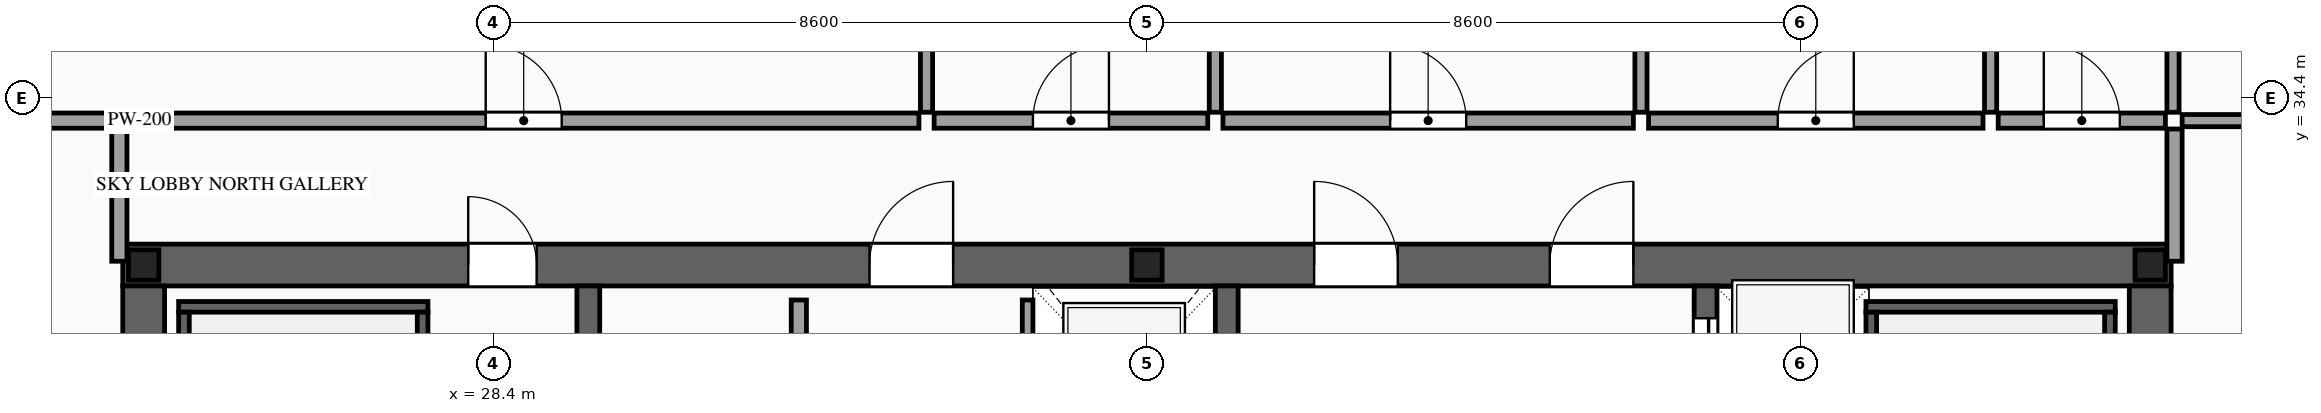
"""IFC4 building model, lengths in metres.
Left out: names, types, materials, properties, quantities, classifications, styles, units other than length and angle.
Written with IfcOpenShell. Run it as: python <this file> out.ifc"""

import sys

from ifc_helpers import new_model, si_unit, direction, frame, frame_2d, origin, origin_2d, place, context, subcontext, project, spatial, rectangle, i_section, extrude, source, transform, mapped, element, fill, save


model = new_model("IFC4")
c1 = context("Model", 3, precision=1e-05, world=origin(), true_north=direction((0.0, 1.0)))
c2 = subcontext(c1, "Body", "Model", "MODEL_VIEW")
j1 = project(units=[si_unit("LENGTHUNIT", "METRE"), si_unit("PLANEANGLEUNIT", "RADIAN")], contexts=[c1])
p1 = place(None, origin())
s1 = spatial("IfcSite", under=j1, at=p1, CompositionType="ELEMENT")
p2 = place(p1, origin())
s2 = spatial("IfcBuilding", under=s1, at=p2, CompositionType="ELEMENT")
p3 = place(p2, frame((0.0, 0.0, 259.1)))
s3 = spatial("IfcBuildingStorey", under=s2, at=p3, CompositionType="ELEMENT", Elevation=259.1)
p4 = place(p3, frame((23.525, 32.2, 0.0), z_axis=(0.0, 0.0, 1.0), x_axis=(1.0, 0.0, 0.0)))
e1 = element("IfcWall", 1, at=p4, inside=s3, PredefinedType="SHEAR", context=c2, shape_type="SweptSolid", body=[
    extrude(rectangle(XDim=26.95, YDim=0.55, at=frame_2d((13.475, 0.0))), origin(), (0.0, 0.0, 1.0), 4.4),
])
p5 = place(p4, frame((4.545, 0.0, 0.0)))
e2 = element("IfcOpeningElement", 2, at=p5, cuts=e1, PredefinedType="OPENING", context=c2, shape_type="SweptSolid", body=[
    extrude(rectangle(XDim=0.9, YDim=2.15, at=frame_2d((0.45, 1.075))), frame((0.0, 0.29, 0.0), z_axis=(0.0, -1.0, 0.0), x_axis=(1.0, 0.0, 0.0)), (0.0, 0.0, 1.0), 0.58),
])
p6 = place(p4, frame((9.825, 0.0, 0.0)))
e3 = element("IfcOpeningElement", 3, at=p6, cuts=e1, PredefinedType="OPENING", context=c2, shape_type="SweptSolid", body=[
    extrude(rectangle(XDim=1.1, YDim=2.2, at=frame_2d((0.55, 1.1))), frame((0.0, 0.29, 0.0), z_axis=(0.0, -1.0, 0.0), x_axis=(1.0, 0.0, 0.0)), (0.0, 0.0, 1.0), 0.58),
])
p7 = place(p4, frame((15.675, 0.0, 0.0)))
e4 = element("IfcOpeningElement", 4, at=p7, cuts=e1, PredefinedType="OPENING", context=c2, shape_type="SweptSolid", body=[
    extrude(rectangle(XDim=1.1, YDim=2.2, at=frame_2d((0.55, 1.1))), frame((0.0, 0.29, 0.0), z_axis=(0.0, -1.0, 0.0), x_axis=(1.0, 0.0, 0.0)), (0.0, 0.0, 1.0), 0.58),
])
p8 = place(p4, frame((18.775, 0.0, 0.0)))
e5 = element("IfcOpeningElement", 5, at=p8, cuts=e1, PredefinedType="OPENING", context=c2, shape_type="SweptSolid", body=[
    extrude(rectangle(XDim=1.1, YDim=2.2, at=frame_2d((0.55, 1.1))), frame((0.0, 0.29, 0.0), z_axis=(0.0, -1.0, 0.0), x_axis=(1.0, 0.0, 0.0)), (0.0, 0.0, 1.0), 0.58),
])
m1 = source(origin(), c2, "Body", "SweptSolid", [
    extrude(rectangle(XDim=12.25, YDim=0.55, at=frame_2d((6.125, 0.0))), origin(), (0.0, 0.0, 1.0), 4.4),
])
for number, where, z_axis, x_axis in (
    (6, (23.8, 19.675, 0.0), (0.0, 0.0, 1.0), (0.0, 1.0, 0.0)),
    (7, (50.2, 19.675, 0.0), (0.0, 0.0, 1.0), (0.0, 1.0, 0.0)),
):
    element("IfcWall", number, at=place(p3, frame(where, z_axis=z_axis, x_axis=x_axis)), inside=s3, PredefinedType="SHEAR", context=c2, shape_type="MappedRepresentation", body=[
        mapped(m1, transform((0.0, 0.0, 0.0), scale=1.0)),
    ])
m2 = source(origin(), c2, "Body", "SweptSolid", [
    extrude(rectangle(XDim=12.25, YDim=0.3, at=frame_2d((6.125, 0.0))), origin(), (0.0, 0.0, 1.0), 4.4),
])
for number, where, z_axis, x_axis in (
    (8, (29.65, 19.675, 0.0), (0.0, 0.0, 1.0), (0.0, 1.0, 0.0)),
    (9, (38.05, 19.675, 0.0), (0.0, 0.0, 1.0), (0.0, 1.0, 0.0)),
):
    element("IfcWall", number, at=place(p3, frame(where, z_axis=z_axis, x_axis=x_axis)), inside=s3, PredefinedType="SOLIDWALL", context=c2, shape_type="MappedRepresentation", body=[
        mapped(m2, transform((0.0, 0.0, 0.0), scale=1.0)),
    ])
p9 = place(p3, frame((44.35, 19.675, 0.0), z_axis=(0.0, 0.0, 1.0), x_axis=(0.0, 1.0, 0.0)))
e10 = element("IfcWall", 10, at=p9, inside=s3, PredefinedType="SOLIDWALL", context=c2, shape_type="SweptSolid", body=[
    extrude(rectangle(XDim=12.25, YDim=0.3, at=frame_2d((6.125, 0.0))), origin(), (0.0, 0.0, 1.0), 4.4),
])
p10 = place(p9, frame((6.525, 0.0, 0.0)))
e11 = element("IfcOpeningElement", 11, at=p10, cuts=e10, PredefinedType="OPENING", context=c2, shape_type="SweptSolid", body=[
    extrude(rectangle(XDim=1.1, YDim=2.2, at=frame_2d((0.55, 1.1))), frame((0.0, 0.165, 0.0), z_axis=(0.0, -1.0, 0.0), x_axis=(1.0, 0.0, 0.0)), (0.0, 0.0, 1.0), 0.33),
])
p11 = place(p9, frame((8.625, 0.0, 0.0)))
e12 = element("IfcOpeningElement", 12, at=p11, cuts=e10, PredefinedType="OPENING", context=c2, shape_type="SweptSolid", body=[
    extrude(rectangle(XDim=1.1, YDim=2.2, at=frame_2d((0.55, 1.1))), frame((0.0, 0.165, 0.0), z_axis=(0.0, -1.0, 0.0), x_axis=(1.0, 0.0, 0.0)), (0.0, 0.0, 1.0), 0.33),
])
p12 = place(p9, frame((10.725, 0.0, 0.0)))
e13 = element("IfcOpeningElement", 13, at=p12, cuts=e10, PredefinedType="OPENING", context=c2, shape_type="SweptSolid", body=[
    extrude(rectangle(XDim=1.1, YDim=2.2, at=frame_2d((0.55, 1.1))), frame((0.0, 0.165, 0.0), z_axis=(0.0, -1.0, 0.0), x_axis=(1.0, 0.0, 0.0)), (0.0, 0.0, 1.0), 0.33),
])
m3 = source(origin(), c2, "Body", "SweptSolid", [
    extrude(i_section(OverallWidth=0.4, OverallDepth=0.4, WebThickness=0.013, FlangeThickness=0.021, at=origin_2d()), origin(), (0.0, 0.0, 1.0), 4.4),
])
for number, where, z_axis, x_axis in (
    (14, (23.8, 32.2, 0.0), (0.0, 0.0, 1.0), (1.0, 0.0, 0.0)),
    (15, (37.0, 32.2, 0.0), (0.0, 0.0, 1.0), (1.0, 0.0, 0.0)),
    (16, (50.2, 32.2, 0.0), (0.0, 0.0, 1.0), (1.0, 0.0, 0.0)),
):
    element("IfcColumn", number, at=place(p3, frame(where, z_axis=z_axis, x_axis=x_axis)), inside=s3, PredefinedType="COLUMN", context=c2, shape_type="MappedRepresentation", body=[
        mapped(m3, transform((0.0, 0.0, 0.0), scale=1.0)),
    ])
p13 = place(p3, frame((35.43, 29.4, 0.0), z_axis=(0.0, 0.0, 1.0), x_axis=(0.0, 1.0, 0.0)))
e17 = element("IfcWall", 17, at=p13, inside=s3, PredefinedType="SOLIDWALL", context=c2, shape_type="SweptSolid", body=[
    extrude(rectangle(XDim=2.34, YDim=0.14, at=frame_2d((1.17, 0.0))), origin(), (0.0, 0.0, 1.0), 4.12),
])
p14 = place(p13, frame((0.62, 0.0, 0.0)))
e18 = element("IfcOpeningElement", 18, at=p14, cuts=e17, PredefinedType="OPENING", context=c2, shape_type="SweptSolid", body=[
    extrude(rectangle(XDim=1.1, YDim=2.2, at=frame_2d((0.55, 1.1))), frame((0.0, 0.085, 0.0), z_axis=(0.0, -1.0, 0.0), x_axis=(1.0, 0.0, 0.0)), (0.0, 0.0, 1.0), 0.17),
])
m4 = source(origin(), c2, "Body", "SweptSolid", [
    extrude(rectangle(XDim=3.28, YDim=0.14, at=frame_2d((1.64, 0.0))), origin(), (0.0, 0.0, 1.0), 4.12),
])
p15 = place(p3, frame((24.26, 31.65, 0.0), z_axis=(0.0, 0.0, 1.0), x_axis=(1.0, 0.0, 0.0)))
e19 = element("IfcWall", 19, at=p15, inside=s3, PredefinedType="SOLIDWALL", context=c2, shape_type="MappedRepresentation", body=[
    mapped(m4, transform((0.0, 0.0, 0.0), scale=1.0)),
])
m5 = source(origin(), c2, "Body", "SweptSolid", [
    extrude(rectangle(XDim=8.94, YDim=0.14, at=frame_2d((4.47, 0.0))), origin(), (0.0, 0.0, 1.0), 4.12),
])
for number, where, z_axis, x_axis in (
    (20, (24.33, 22.64, 0.0), (0.0, 0.0, 1.0), (0.0, 1.0, 0.0)),
    (21, (27.47, 22.64, 0.0), (0.0, 0.0, 1.0), (0.0, 1.0, 0.0)),
):
    element("IfcWall", number, at=place(p3, frame(where, z_axis=z_axis, x_axis=x_axis)), inside=s3, PredefinedType="SOLIDWALL", context=c2, shape_type="MappedRepresentation", body=[
        mapped(m5, transform((0.0, 0.0, 0.0), scale=1.0)),
    ])
p16 = place(p3, frame((46.46, 31.65, 0.0), z_axis=(0.0, 0.0, 1.0), x_axis=(1.0, 0.0, 0.0)))
e22 = element("IfcWall", 22, at=p16, inside=s3, PredefinedType="SOLIDWALL", context=c2, shape_type="MappedRepresentation", body=[
    mapped(m4, transform((0.0, 0.0, 0.0), scale=1.0)),
])
for number, where, z_axis, x_axis in (
    (23, (46.53, 22.64, 0.0), (0.0, 0.0, 1.0), (0.0, 1.0, 0.0)),
    (24, (49.67, 22.64, 0.0), (0.0, 0.0, 1.0), (0.0, 1.0, 0.0)),
):
    element("IfcWall", number, at=place(p3, frame(where, z_axis=z_axis, x_axis=x_axis)), inside=s3, PredefinedType="SOLIDWALL", context=c2, shape_type="MappedRepresentation", body=[
        mapped(m5, transform((0.0, 0.0, 0.0), scale=1.0)),
    ])
p17 = place(p3, frame((32.42, 24.05, 0.0), z_axis=(0.0, 0.0, 1.0), x_axis=(0.0, 1.0, 0.0)))
e25 = element("IfcWall", 25, at=p17, inside=s3, PredefinedType="PARTITIONING", context=c2, shape_type="SweptSolid", body=[
    extrude(rectangle(XDim=7.69, YDim=0.2, at=frame_2d((3.845, 0.0))), origin(), (0.0, 0.0, 1.0), 4.12),
])
p18 = place(p17, frame((3.395, 0.0, 0.0)))
e26 = element("IfcOpeningElement", 26, at=p18, cuts=e25, PredefinedType="OPENING", context=c2, shape_type="SweptSolid", body=[
    extrude(rectangle(XDim=0.9, YDim=2.15, at=frame_2d((0.45, 1.075))), frame((0.0, 0.115, 0.0), z_axis=(0.0, -1.0, 0.0), x_axis=(1.0, 0.0, 0.0)), (0.0, 0.0, 1.0), 0.23),
])
m6 = source(origin(), c2, "Body", "SweptSolid", [
    extrude(rectangle(XDim=1.74, YDim=0.2, at=frame_2d((0.87, 0.0))), origin(), (0.0, 0.0, 1.0), 4.12),
])
for number, where, z_axis, x_axis in (
    (27, (23.48, 32.25, 0.0), (0.0, 0.0, 1.0), (0.0, 1.0, 0.0)),
    (28, (50.52, 32.25, 0.0), (0.0, 0.0, 1.0), (0.0, 1.0, 0.0)),
):
    element("IfcWall", number, at=place(p3, frame(where, z_axis=z_axis, x_axis=x_axis)), inside=s3, PredefinedType="PARTITIONING", context=c2, shape_type="MappedRepresentation", body=[
        mapped(m6, transform((0.0, 0.0, 0.0), scale=1.0)),
    ])
m7 = source(origin(), c2, "Body", "SweptSolid", [
    extrude(rectangle(XDim=6.83, YDim=0.16, at=frame_2d((3.415, 0.0))), origin(), (0.0, 0.0, 1.0), 4.12),
])
p19 = place(p3, frame((50.62, 34.1, 0.0), z_axis=(0.0, 0.0, 1.0), x_axis=(1.0, 0.0, 0.0)))
e29 = element("IfcWall", 29, at=p19, inside=s3, PredefinedType="PARTITIONING", context=c2, shape_type="MappedRepresentation", body=[
    mapped(m7, transform((0.0, 0.0, 0.0), scale=1.0)),
])
p20 = place(p3, frame((19.44, 34.1, 0.0), z_axis=(0.0, 0.0, 1.0), x_axis=(1.0, 0.0, 0.0)))
e30 = element("IfcWall", 30, at=p20, inside=s3, PredefinedType="PARTITIONING", context=c2, shape_type="SweptSolid", body=[
    extrude(rectangle(XDim=14.56, YDim=0.2, at=frame_2d((7.28, 0.0))), origin(), (0.0, 0.0, 1.0), 4.12),
])
p21 = place(p20, frame((8.86, 0.0, 0.0)))
e31 = element("IfcOpeningElement", 31, at=p21, cuts=e30, PredefinedType="OPENING", context=c2, shape_type="SweptSolid", body=[
    extrude(rectangle(XDim=1.0, YDim=2.2, at=frame_2d((0.5, 1.1))), frame((0.0, 0.115, 0.0), z_axis=(0.0, -1.0, 0.0), x_axis=(1.0, 0.0, 0.0)), (0.0, 0.0, 1.0), 0.23),
])
m8 = source(origin(), c2, "Body", "SweptSolid", [
    extrude(rectangle(XDim=12.04, YDim=0.16, at=frame_2d((6.02, 0.0))), origin(), (0.0, 0.0, 1.0), 4.12),
])
p22 = place(p3, frame((34.1, 34.21, 0.0), z_axis=(0.0, 0.0, 1.0), x_axis=(0.0, 1.0, 0.0)))
e32 = element("IfcWall", 32, at=p22, inside=s3, PredefinedType="PARTITIONING", context=c2, shape_type="MappedRepresentation", body=[
    mapped(m8, transform((0.0, 0.0, 0.0), scale=1.0)),
])
p23 = place(p3, frame((34.2, 34.1, 0.0), z_axis=(0.0, 0.0, 1.0), x_axis=(1.0, 0.0, 0.0)))
e33 = element("IfcWall", 33, at=p23, inside=s3, PredefinedType="PARTITIONING", context=c2, shape_type="SweptSolid", body=[
    extrude(rectangle(XDim=3.6, YDim=0.2, at=frame_2d((1.8, 0.0))), origin(), (0.0, 0.0, 1.0), 4.12),
])
p24 = place(p23, frame((1.3, 0.0, 0.0)))
e34 = element("IfcOpeningElement", 34, at=p24, cuts=e33, PredefinedType="OPENING", context=c2, shape_type="SweptSolid", body=[
    extrude(rectangle(XDim=1.0, YDim=2.2, at=frame_2d((0.5, 1.1))), frame((0.0, 0.115, 0.0), z_axis=(0.0, -1.0, 0.0), x_axis=(1.0, 0.0, 0.0)), (0.0, 0.0, 1.0), 0.23),
])
p25 = place(p3, frame((37.9, 34.21, 0.0), z_axis=(0.0, 0.0, 1.0), x_axis=(0.0, 1.0, 0.0)))
e35 = element("IfcWall", 35, at=p25, inside=s3, PredefinedType="PARTITIONING", context=c2, shape_type="MappedRepresentation", body=[
    mapped(m8, transform((0.0, 0.0, 0.0), scale=1.0)),
])
p26 = place(p3, frame((38.0, 34.1, 0.0), z_axis=(0.0, 0.0, 1.0), x_axis=(1.0, 0.0, 0.0)))
e36 = element("IfcWall", 36, at=p26, inside=s3, PredefinedType="PARTITIONING", context=c2, shape_type="SweptSolid", body=[
    extrude(rectangle(XDim=5.4, YDim=0.2, at=frame_2d((2.7, 0.0))), origin(), (0.0, 0.0, 1.0), 4.12),
])
p27 = place(p26, frame((2.2, 0.0, 0.0)))
e37 = element("IfcOpeningElement", 37, at=p27, cuts=e36, PredefinedType="OPENING", context=c2, shape_type="SweptSolid", body=[
    extrude(rectangle(XDim=1.0, YDim=2.2, at=frame_2d((0.5, 1.1))), frame((0.0, 0.115, 0.0), z_axis=(0.0, -1.0, 0.0), x_axis=(1.0, 0.0, 0.0)), (0.0, 0.0, 1.0), 0.23),
])
p28 = place(p3, frame((43.5, 34.21, 0.0), z_axis=(0.0, 0.0, 1.0), x_axis=(0.0, 1.0, 0.0)))
e38 = element("IfcWall", 38, at=p28, inside=s3, PredefinedType="PARTITIONING", context=c2, shape_type="MappedRepresentation", body=[
    mapped(m8, transform((0.0, 0.0, 0.0), scale=1.0)),
])
p29 = place(p3, frame((43.6, 34.1, 0.0), z_axis=(0.0, 0.0, 1.0), x_axis=(1.0, 0.0, 0.0)))
e39 = element("IfcWall", 39, at=p29, inside=s3, PredefinedType="PARTITIONING", context=c2, shape_type="SweptSolid", body=[
    extrude(rectangle(XDim=4.4, YDim=0.2, at=frame_2d((2.2, 0.0))), origin(), (0.0, 0.0, 1.0), 4.12),
])
p30 = place(p29, frame((1.7, 0.0, 0.0)))
e40 = element("IfcOpeningElement", 40, at=p30, cuts=e39, PredefinedType="OPENING", context=c2, shape_type="SweptSolid", body=[
    extrude(rectangle(XDim=1.0, YDim=2.2, at=frame_2d((0.5, 1.1))), frame((0.0, 0.115, 0.0), z_axis=(0.0, -1.0, 0.0), x_axis=(1.0, 0.0, 0.0)), (0.0, 0.0, 1.0), 0.23),
])
p31 = place(p3, frame((48.1, 34.21, 0.0), z_axis=(0.0, 0.0, 1.0), x_axis=(0.0, 1.0, 0.0)))
e41 = element("IfcWall", 41, at=p31, inside=s3, PredefinedType="PARTITIONING", context=c2, shape_type="MappedRepresentation", body=[
    mapped(m8, transform((0.0, 0.0, 0.0), scale=1.0)),
])
p32 = place(p3, frame((48.2, 34.1, 0.0), z_axis=(0.0, 0.0, 1.0), x_axis=(1.0, 0.0, 0.0)))
e42 = element("IfcWall", 42, at=p32, inside=s3, PredefinedType="PARTITIONING", context=c2, shape_type="SweptSolid", body=[
    extrude(rectangle(XDim=2.2, YDim=0.2, at=frame_2d((1.1, 0.0))), origin(), (0.0, 0.0, 1.0), 4.12),
])
p33 = place(p32, frame((0.6, 0.0, 0.0)))
e43 = element("IfcOpeningElement", 43, at=p33, cuts=e42, PredefinedType="OPENING", context=c2, shape_type="SweptSolid", body=[
    extrude(rectangle(XDim=1.0, YDim=2.2, at=frame_2d((0.5, 1.1))), frame((0.0, 0.115, 0.0), z_axis=(0.0, -1.0, 0.0), x_axis=(1.0, 0.0, 0.0)), (0.0, 0.0, 1.0), 0.23),
])
p34 = place(p3, frame((50.5, 34.21, 0.0), z_axis=(0.0, 0.0, 1.0), x_axis=(0.0, 1.0, 0.0)))
e44 = element("IfcWall", 44, at=p34, inside=s3, PredefinedType="PARTITIONING", context=c2, shape_type="MappedRepresentation", body=[
    mapped(m8, transform((0.0, 0.0, 0.0), scale=1.0)),
])
m9 = source(origin(), c2, "Body", "SweptSolid", [
    extrude(rectangle(XDim=1.1, YDim=2.2, at=frame_2d((0.55, 1.1))), frame((0.0, 0.025, 0.0), z_axis=(0.0, -1.0, 0.0), x_axis=(1.0, 0.0, 0.0)), (0.0, 0.0, 1.0), 0.05),
])
p35 = place(p12, origin())
e45 = element("IfcDoor", 45, at=p35, inside=s3, OperationType="SLIDING_TO_LEFT", PredefinedType="DOOR", context=c2, shape_type="MappedRepresentation", body=[
    mapped(m9, transform((0.0, 0.0, 0.0), scale=1.0)),
])
fill(e13, e45)
m10 = source(origin(), c2, "Body", "SweptSolid", [
    extrude(rectangle(XDim=0.9, YDim=2.15, at=frame_2d((0.45, 1.075))), frame((0.0, 0.025, 0.0), z_axis=(0.0, -1.0, 0.0), x_axis=(1.0, 0.0, 0.0)), (0.0, 0.0, 1.0), 0.05),
])
p36 = place(p5, origin())
e46 = element("IfcDoor", 46, at=p36, inside=s3, OperationType="SINGLE_SWING_LEFT", PredefinedType="DOOR", context=c2, shape_type="MappedRepresentation", body=[
    mapped(m10, transform((0.0, 0.0, 0.0), scale=1.0)),
])
fill(e2, e46)
m11 = source(origin(), c2, "Body", "SweptSolid", [
    extrude(rectangle(XDim=1.1, YDim=2.2, at=frame_2d((0.55, 1.1))), frame((0.0, 0.025, 0.0), z_axis=(0.0, -1.0, 0.0), x_axis=(1.0, 0.0, 0.0)), (0.0, 0.0, 1.0), 0.05),
])
p37 = place(p6, origin())
e47 = element("IfcDoor", 47, at=p37, inside=s3, OperationType="SINGLE_SWING_RIGHT", PredefinedType="DOOR", context=c2, shape_type="MappedRepresentation", body=[
    mapped(m11, transform((0.0, 0.0, 0.0), scale=1.0)),
])
fill(e3, e47)
p38 = place(p7, origin())
e48 = element("IfcDoor", 48, at=p38, inside=s3, OperationType="SINGLE_SWING_LEFT", PredefinedType="DOOR", context=c2, shape_type="MappedRepresentation", body=[
    mapped(m11, transform((0.0, 0.0, 0.0), scale=1.0)),
])
fill(e4, e48)
p39 = place(p8, origin())
e49 = element("IfcDoor", 49, at=p39, inside=s3, OperationType="SINGLE_SWING_RIGHT", PredefinedType="DOOR", context=c2, shape_type="MappedRepresentation", body=[
    mapped(m11, transform((0.0, 0.0, 0.0), scale=1.0)),
])
fill(e5, e49)
m12 = source(origin(), c2, "Body", "SweptSolid", [
    extrude(rectangle(XDim=1.0, YDim=2.2, at=frame_2d((0.5, 1.1))), frame((0.0, 0.025, 0.0), z_axis=(0.0, -1.0, 0.0), x_axis=(1.0, 0.0, 0.0)), (0.0, 0.0, 1.0), 0.05),
])
p40 = place(p21, origin())
e50 = element("IfcDoor", 50, at=p40, inside=s3, OperationType="SINGLE_SWING_LEFT", PredefinedType="DOOR", context=c2, shape_type="MappedRepresentation", body=[
    mapped(m12, transform((0.0, 0.0, 0.0), scale=1.0)),
])
fill(e31, e50)
p41 = place(p24, origin())
e51 = element("IfcDoor", 51, at=p41, inside=s3, OperationType="SINGLE_SWING_RIGHT", PredefinedType="DOOR", context=c2, shape_type="MappedRepresentation", body=[
    mapped(m12, transform((0.0, 0.0, 0.0), scale=1.0)),
])
fill(e34, e51)
p42 = place(p27, origin())
e52 = element("IfcDoor", 52, at=p42, inside=s3, OperationType="SINGLE_SWING_LEFT", PredefinedType="DOOR", context=c2, shape_type="MappedRepresentation", body=[
    mapped(m12, transform((0.0, 0.0, 0.0), scale=1.0)),
])
fill(e37, e52)
p43 = place(p30, origin())
e53 = element("IfcDoor", 53, at=p43, inside=s3, OperationType="SINGLE_SWING_RIGHT", PredefinedType="DOOR", context=c2, shape_type="MappedRepresentation", body=[
    mapped(m12, transform((0.0, 0.0, 0.0), scale=1.0)),
])
fill(e40, e53)
p44 = place(p33, origin())
e54 = element("IfcDoor", 54, at=p44, inside=s3, OperationType="SINGLE_SWING_LEFT", PredefinedType="DOOR", context=c2, shape_type="MappedRepresentation", body=[
    mapped(m12, transform((0.0, 0.0, 0.0), scale=1.0)),
])
fill(e43, e54)
save(model, sys.argv[1])
